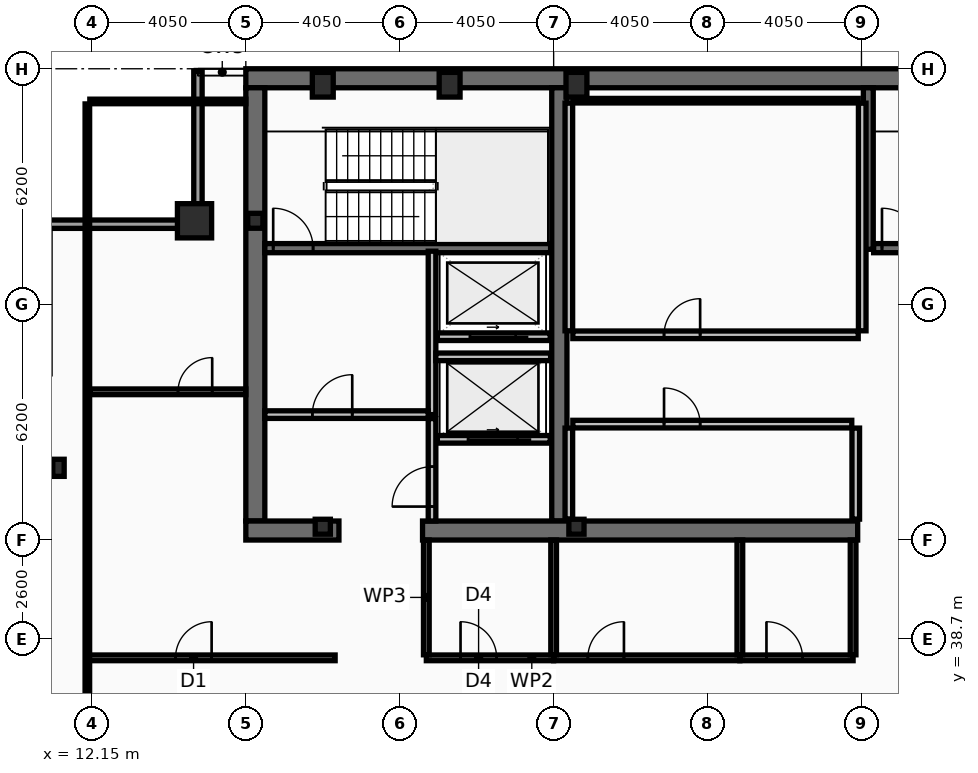
"""IFC4 building model, lengths in metres.
Left out: names, types, materials, properties, quantities, classifications, styles, units other than length and angle.
Written with IfcOpenShell. Run it as: python <this file> out.ifc"""

import sys

from ifc_helpers import new_model, si_unit, direction, frame, frame_2d, origin, origin_2d, place, context, subcontext, project, spatial, rectangle, hollow_rectangle, i_section, extrude, element, fill, save


model = new_model("IFC4")
c1 = context("Model", 3, precision=1e-05, world=origin(), true_north=direction((0.0, 1.0)))
c2 = subcontext(c1, "Body", "Model", "MODEL_VIEW")
j1 = project(units=[si_unit("LENGTHUNIT", "METRE"), si_unit("PLANEANGLEUNIT", "RADIAN")], contexts=[c1])
p1 = place(None, origin())
s1 = spatial("IfcSite", under=j1, at=p1, CompositionType="ELEMENT")
p2 = place(p1, origin())
s2 = spatial("IfcBuilding", under=s1, at=p2, CompositionType="ELEMENT")
p3 = place(p2, frame((0.0, 0.0, 336.2)))
s3 = spatial("IfcBuildingStorey", under=s2, at=p3, CompositionType="ELEMENT", Elevation=336.2)
p4 = place(p3, frame((16.2, 53.45, 0.0), z_axis=(0.0, 0.0, 1.0), x_axis=(1.0, 0.0, 0.0)))
e1 = element("IfcWall", 1, at=p4, inside=s3, PredefinedType="SHEAR", context=c2, shape_type="SweptSolid", body=[
    extrude(rectangle(XDim=40.5, YDim=0.5, at=frame_2d((20.25, 0.0))), origin(), (0.0, 0.0, 1.0), 3.44),
])
p5 = place(p3, frame((16.45, 41.8, 0.0), z_axis=(0.0, 0.0, 1.0), x_axis=(0.0, 1.0, 0.0)))
e2 = element("IfcWall", 2, at=p5, inside=s3, PredefinedType="SHEAR", context=c2, shape_type="SweptSolid", body=[
    extrude(rectangle(XDim=11.4, YDim=0.5, at=frame_2d((5.7, 0.0))), origin(), (0.0, 0.0, 1.0), 3.44),
])
p6 = place(p3, frame((24.45, 41.8, 0.0), z_axis=(0.0, 0.0, 1.0), x_axis=(0.0, 1.0, 0.0)))
e3 = element("IfcWall", 3, at=p6, inside=s3, PredefinedType="SHEAR", context=c2, shape_type="SweptSolid", body=[
    extrude(rectangle(XDim=11.4, YDim=0.4, at=frame_2d((5.7, 0.0))), origin(), (0.0, 0.0, 1.0), 3.44),
])
p7 = place(p3, frame((18.65, 41.55, 0.0), z_axis=(0.0, 0.0, 1.0), x_axis=(-1.0, 0.0, 0.0)))
e4 = element("IfcWall", 4, at=p7, inside=s3, PredefinedType="SHEAR", context=c2, shape_type="SweptSolid", body=[
    extrude(rectangle(XDim=2.45, YDim=0.5, at=frame_2d((1.225, 0.0))), origin(), (0.0, 0.0, 1.0), 3.44),
])
p8 = place(p3, frame((32.3, 41.55, 0.0), z_axis=(0.0, 0.0, 1.0), x_axis=(-1.0, 0.0, 0.0)))
e5 = element("IfcWall", 5, at=p8, inside=s3, PredefinedType="SHEAR", context=c2, shape_type="SweptSolid", body=[
    extrude(rectangle(XDim=11.45, YDim=0.5, at=frame_2d((5.725, 0.0))), origin(), (0.0, 0.0, 1.0), 3.44),
])
p9 = place(p3, frame((32.58, 48.95, 0.0), z_axis=(0.0, 0.0, 1.0), x_axis=(0.0, 1.0, 0.0)))
e6 = element("IfcWall", 6, at=p9, inside=s3, PredefinedType="SHEAR", context=c2, shape_type="SweptSolid", body=[
    extrude(rectangle(XDim=4.25, YDim=0.26, at=frame_2d((2.125, 0.0))), origin(), (0.0, 0.0, 1.0), 3.44),
])
p10 = place(p3, frame((16.7, 48.98, 0.0), z_axis=(0.0, 0.0, 1.0), x_axis=(1.0, 0.0, 0.0)))
e7 = element("IfcWall", 7, at=p10, inside=s3, PredefinedType="SHEAR", context=c2, shape_type="SweptSolid", body=[
    extrude(rectangle(XDim=7.52, YDim=0.24, at=frame_2d((3.76, 0.0))), origin(), (0.0, 0.0, 1.0), 3.44),
])
p11 = place(p10, frame((0.22, 0.0, 0.0)))
e8 = element("IfcOpeningElement", 8, at=p11, cuts=e7, PredefinedType="OPENING", context=c2, shape_type="SweptSolid", body=[
    extrude(rectangle(XDim=1.05, YDim=2.15, at=frame_2d((0.525, 1.075))), frame((0.0, 0.13, 0.0), z_axis=(0.0, -1.0, 0.0), x_axis=(1.0, 0.0, 0.0)), (0.0, 0.0, 1.0), 0.26),
])
p12 = place(p3, frame((32.72, 48.98, 0.0), z_axis=(0.0, 0.0, 1.0), x_axis=(1.0, 0.0, 0.0)))
e9 = element("IfcWall", 9, at=p12, inside=s3, PredefinedType="SHEAR", context=c2, shape_type="SweptSolid", body=[
    extrude(rectangle(XDim=7.56, YDim=0.24, at=frame_2d((3.78, 0.0))), origin(), (0.0, 0.0, 1.0), 3.44),
])
p13 = place(p12, frame((0.22, 0.0, 0.0)))
e10 = element("IfcOpeningElement", 10, at=p13, cuts=e9, PredefinedType="OPENING", context=c2, shape_type="SweptSolid", body=[
    extrude(rectangle(XDim=1.05, YDim=2.15, at=frame_2d((0.525, 1.075))), frame((0.0, 0.13, 0.0), z_axis=(0.0, -1.0, 0.0), x_axis=(1.0, 0.0, 0.0)), (0.0, 0.0, 1.0), 0.26),
])
p14 = place(p3, frame((14.85, 49.7, 0.0), z_axis=(0.0, 0.0, 1.0), x_axis=(1.0, 0.0, 0.0)))
e11 = element("IfcColumn", 11, at=p14, inside=s3, PredefinedType="COLUMN", context=c2, shape_type="SweptSolid", body=[
    extrude(hollow_rectangle(XDim=0.9, YDim=0.9, WallThickness=0.05, at=origin_2d()), origin(), (0.0, 0.0, 1.0), 3.6),
])
for number, where, z_axis, x_axis in (
    (12, (18.225, 53.28, 0.0), (0.0, 0.0, 1.0), (1.0, 0.0, 0.0)),
    (13, (21.562, 53.28, 0.0), (0.0, 0.0, 1.0), (1.0, 0.0, 0.0)),
    (14, (24.9, 53.28, 0.0), (0.0, 0.0, 1.0), (1.0, 0.0, 0.0)),
):
    element("IfcColumn", number, at=place(p3, frame(where, z_axis=z_axis, x_axis=x_axis)), inside=s3, PredefinedType="COLUMN", context=c2, shape_type="SweptSolid", body=[
        extrude(hollow_rectangle(XDim=0.55, YDim=0.65, WallThickness=0.04, at=origin_2d()), origin(), (0.0, 0.0, 1.0), 3.6),
    ])
p15 = place(p3, frame((11.27, 43.2, 0.0), z_axis=(0.0, 0.0, 1.0), x_axis=(1.0, 0.0, 0.0)))
e15 = element("IfcColumn", 15, at=p15, inside=s3, PredefinedType="COLUMN", context=c2, shape_type="SweptSolid", body=[
    extrude(i_section(OverallWidth=0.3, OverallDepth=0.45, WebThickness=0.014, FlangeThickness=0.026, at=origin_2d()), origin(), (0.0, 0.0, 1.0), 3.6),
])
for number, where, z_axis, x_axis in (
    (16, (16.45, 49.7, 0.0), (0.0, 0.0, 1.0), (1.0, 0.0, 0.0)),
    (17, (18.225, 41.65, 0.0), (0.0, 0.0, 1.0), (1.0, 0.0, 0.0)),
    (18, (24.9, 41.65, 0.0), (0.0, 0.0, 1.0), (1.0, 0.0, 0.0)),
):
    element("IfcColumn", number, at=place(p3, frame(where, z_axis=z_axis, x_axis=x_axis)), inside=s3, PredefinedType="COLUMN", context=c2, shape_type="SweptSolid", body=[
        extrude(i_section(OverallWidth=0.399, OverallDepth=0.393, WebThickness=0.023, FlangeThickness=0.037, at=origin_2d()), origin(), (0.0, 0.0, 1.0), 3.6),
    ])
p16 = place(p3, frame((10.83, 49.61, 0.0), z_axis=(0.0, 0.0, 1.0), x_axis=(1.0, 0.0, 0.0)))
e19 = element("IfcWall", 19, at=p16, inside=s3, PredefinedType="SOLIDWALL", context=c2, shape_type="SweptSolid", body=[
    extrude(rectangle(XDim=4.22, YDim=0.22, at=frame_2d((2.11, 0.0))), origin(), (0.0, 0.0, 1.0), 2.88),
])
p17 = place(p3, frame((14.94, 49.72, 0.0), z_axis=(0.0, 0.0, 1.0), x_axis=(0.0, 1.0, 0.0)))
e20 = element("IfcWall", 20, at=p17, inside=s3, PredefinedType="SOLIDWALL", context=c2, shape_type="SweptSolid", body=[
    extrude(rectangle(XDim=3.91, YDim=0.22, at=frame_2d((1.955, 0.0))), origin(), (0.0, 0.0, 1.0), 2.88),
])
p18 = place(p3, frame((24.21, 43.95, 0.0), z_axis=(0.0, 0.0, 1.0), x_axis=(-1.0, 0.0, 0.0)))
e21 = element("IfcWall", 21, at=p18, inside=s3, PredefinedType="PARTITIONING", context=c2, shape_type="SweptSolid", body=[
    extrude(rectangle(XDim=2.97, YDim=0.2, at=frame_2d((1.485, 0.0))), origin(), (0.0, 0.0, 1.0), 3.44),
])
p19 = place(p18, frame((0.86, 0.0, 0.0)))
e22 = element("IfcOpeningElement", 22, at=p19, cuts=e21, PredefinedType="OPENING", context=c2, shape_type="SweptSolid", body=[
    extrude(rectangle(XDim=1.3, YDim=2.18, at=frame_2d((0.65, 1.09))), frame((0.0, 0.11, 0.0), z_axis=(0.0, -1.0, 0.0), x_axis=(1.0, 0.0, 0.0)), (0.0, 0.0, 1.0), 0.22),
])
p20 = place(p3, frame((24.21, 46.65, 0.0), z_axis=(0.0, 0.0, 1.0), x_axis=(-1.0, 0.0, 0.0)))
e23 = element("IfcWall", 23, at=p20, inside=s3, PredefinedType="PARTITIONING", context=c2, shape_type="SweptSolid", body=[
    extrude(rectangle(XDim=2.97, YDim=0.2, at=frame_2d((1.485, 0.0))), origin(), (0.0, 0.0, 1.0), 3.44),
])
p21 = place(p20, frame((0.91, 0.0, 0.0)))
e24 = element("IfcOpeningElement", 24, at=p21, cuts=e23, PredefinedType="OPENING", context=c2, shape_type="SweptSolid", body=[
    extrude(rectangle(XDim=1.2, YDim=2.18, at=frame_2d((0.6, 1.09))), frame((0.0, 0.11, 0.0), z_axis=(0.0, -1.0, 0.0), x_axis=(1.0, 0.0, 0.0)), (0.0, 0.0, 1.0), 0.22),
])
p22 = place(p3, frame((21.1, 44.6, 0.0), z_axis=(0.0, 0.0, 1.0), x_axis=(0.0, 1.0, 0.0)))
e25 = element("IfcWall", 25, at=p22, inside=s3, PredefinedType="PARTITIONING", context=c2, shape_type="SweptSolid", body=[
    extrude(rectangle(XDim=4.3, YDim=0.2, at=frame_2d((2.15, 0.0))), origin(), (0.0, 0.0, 1.0), 3.44),
])
p23 = place(p3, frame((16.7, 44.6, 0.0), z_axis=(0.0, 0.0, 1.0), x_axis=(1.0, 0.0, 0.0)))
e26 = element("IfcWall", 26, at=p23, inside=s3, PredefinedType="PARTITIONING", context=c2, shape_type="SweptSolid", body=[
    extrude(rectangle(XDim=4.3, YDim=0.2, at=frame_2d((2.15, 0.0))), origin(), (0.0, 0.0, 1.0), 3.44),
])
p24 = place(p23, frame((1.25, 0.0, 0.0)))
e27 = element("IfcOpeningElement", 27, at=p24, cuts=e26, PredefinedType="OPENING", context=c2, shape_type="SweptSolid", body=[
    extrude(rectangle(XDim=1.05, YDim=2.15, at=frame_2d((0.525, 1.075))), frame((0.0, 0.11, 0.0), z_axis=(0.0, -1.0, 0.0), x_axis=(1.0, 0.0, 0.0)), (0.0, 0.0, 1.0), 0.22),
])
p25 = place(p3, frame((21.2, 46.12, 0.0), z_axis=(0.0, 0.0, 1.0), x_axis=(1.0, 0.0, 0.0)))
e28 = element("IfcWall", 28, at=p25, inside=s3, PredefinedType="PARTITIONING", context=c2, shape_type="SweptSolid", body=[
    extrude(rectangle(XDim=3.02, YDim=0.2, at=frame_2d((1.51, 0.0))), origin(), (0.0, 0.0, 1.0), 3.44),
])
p26 = place(p3, frame((21.1, 41.8, 0.0), z_axis=(0.0, 0.0, 1.0), x_axis=(0.0, 1.0, 0.0)))
e29 = element("IfcWall", 29, at=p26, inside=s3, PredefinedType="PARTITIONING", context=c2, shape_type="SweptSolid", body=[
    extrude(rectangle(XDim=2.695, YDim=0.2, at=frame_2d((1.348, 0.0))), origin(), (0.0, 0.0, 1.0), 3.44),
])
p27 = place(p26, frame((0.38, 0.0, 0.0)))
e30 = element("IfcOpeningElement", 30, at=p27, cuts=e29, PredefinedType="OPENING", context=c2, shape_type="SweptSolid", body=[
    extrude(rectangle(XDim=1.05, YDim=2.15, at=frame_2d((0.525, 1.075))), frame((0.0, 0.11, 0.0), z_axis=(0.0, -1.0, 0.0), x_axis=(1.0, 0.0, 0.0)), (0.0, 0.0, 1.0), 0.22),
])
for number, where, z_axis, x_axis in (
    (31, (24.7, 46.805, 0.0), (0.0, 0.0, 1.0), (0.0, 1.0, 0.0)),
    (32, (32.42, 46.805, 0.0), (0.0, 0.0, 1.0), (0.0, 1.0, 0.0)),
):
    element("IfcWall", number, at=place(p3, frame(where, z_axis=z_axis, x_axis=x_axis)), inside=s3, PredefinedType="PARTITIONING", context=c2, shape_type="SweptSolid", body=[
        extrude(rectangle(XDim=5.99, YDim=0.2, at=frame_2d((2.995, 0.0))), origin(), (0.0, 0.0, 1.0), 3.44),
    ])
p28 = place(p3, frame((24.805, 52.86, 0.0), z_axis=(0.0, 0.0, 1.0), x_axis=(1.0, 0.0, 0.0)))
e33 = element("IfcWall", 33, at=p28, inside=s3, PredefinedType="PARTITIONING", context=c2, shape_type="SweptSolid", body=[
    extrude(rectangle(XDim=7.51, YDim=0.12, at=frame_2d((3.755, 0.0))), origin(), (0.0, 0.0, 1.0), 3.44),
])
p29 = place(p3, frame((24.805, 46.7, 0.0), z_axis=(0.0, 0.0, 1.0), x_axis=(1.0, 0.0, 0.0)))
e34 = element("IfcWall", 34, at=p29, inside=s3, PredefinedType="PARTITIONING", context=c2, shape_type="SweptSolid", body=[
    extrude(rectangle(XDim=7.51, YDim=0.2, at=frame_2d((3.755, 0.0))), origin(), (0.0, 0.0, 1.0), 3.44),
])
p30 = place(p29, frame((2.4, 0.0, 0.0)))
e35 = element("IfcOpeningElement", 35, at=p30, cuts=e34, PredefinedType="OPENING", context=c2, shape_type="SweptSolid", body=[
    extrude(rectangle(XDim=0.95, YDim=2.1, at=frame_2d((0.475, 1.05))), frame((0.0, 0.11, 0.0), z_axis=(0.0, -1.0, 0.0), x_axis=(1.0, 0.0, 0.0)), (0.0, 0.0, 1.0), 0.22),
])
for number, where, z_axis, x_axis in (
    (36, (24.7, 41.85, 0.0), (0.0, 0.0, 1.0), (0.0, 1.0, 0.0)),
    (37, (32.25, 41.85, 0.0), (0.0, 0.0, 1.0), (0.0, 1.0, 0.0)),
):
    element("IfcWall", number, at=place(p3, frame(where, z_axis=z_axis, x_axis=x_axis)), inside=s3, PredefinedType="PARTITIONING", context=c2, shape_type="SweptSolid", body=[
        extrude(rectangle(XDim=2.395, YDim=0.2, at=frame_2d((1.198, 0.0))), origin(), (0.0, 0.0, 1.0), 3.44),
    ])
p31 = place(p3, frame((24.805, 44.35, 0.0), z_axis=(0.0, 0.0, 1.0), x_axis=(1.0, 0.0, 0.0)))
e38 = element("IfcWall", 38, at=p31, inside=s3, PredefinedType="PARTITIONING", context=c2, shape_type="SweptSolid", body=[
    extrude(rectangle(XDim=7.34, YDim=0.2, at=frame_2d((3.67, 0.0))), origin(), (0.0, 0.0, 1.0), 3.44),
])
p32 = place(p31, frame((2.4, 0.0, 0.0)))
e39 = element("IfcOpeningElement", 39, at=p32, cuts=e38, PredefinedType="OPENING", context=c2, shape_type="SweptSolid", body=[
    extrude(rectangle(XDim=0.95, YDim=2.1, at=frame_2d((0.475, 1.05))), frame((0.0, 0.11, 0.0), z_axis=(0.0, -1.0, 0.0), x_axis=(1.0, 0.0, 0.0)), (0.0, 0.0, 1.0), 0.22),
])
p33 = place(p3, frame((20.95, 38.2, 0.0), z_axis=(0.0, 0.0, 1.0), x_axis=(1.0, 0.0, 0.0)))
e40 = element("IfcWall", 40, at=p33, inside=s3, PredefinedType="PARTITIONING", context=c2, shape_type="SweptSolid", body=[
    extrude(rectangle(XDim=3.35, YDim=0.15, at=frame_2d((1.675, 0.0))), origin(), (0.0, 0.0, 1.0), 3.44),
])
p34 = place(p33, frame((0.9, 0.0, 0.0)))
e41 = element("IfcOpeningElement", 41, at=p34, cuts=e40, PredefinedType="OPENING", context=c2, shape_type="SweptSolid", body=[
    extrude(rectangle(XDim=0.95, YDim=2.05, at=frame_2d((0.475, 1.025))), frame((0.0, 0.085, 0.0), z_axis=(0.0, -1.0, 0.0), x_axis=(1.0, 0.0, 0.0)), (0.0, 0.0, 1.0), 0.17),
])
p35 = place(p3, frame((24.3, 38.2, 0.0), z_axis=(0.0, 0.0, 1.0), x_axis=(1.0, 0.0, 0.0)))
e42 = element("IfcWall", 42, at=p35, inside=s3, PredefinedType="PARTITIONING", context=c2, shape_type="SweptSolid", body=[
    extrude(rectangle(XDim=4.9, YDim=0.15, at=frame_2d((2.45, 0.0))), origin(), (0.0, 0.0, 1.0), 2.83),
])
p36 = place(p35, frame((0.9, 0.0, 0.0)))
e43 = element("IfcOpeningElement", 43, at=p36, cuts=e42, PredefinedType="OPENING", context=c2, shape_type="SweptSolid", body=[
    extrude(rectangle(XDim=0.95, YDim=2.05, at=frame_2d((0.475, 1.025))), frame((0.0, 0.085, 0.0), z_axis=(0.0, -1.0, 0.0), x_axis=(1.0, 0.0, 0.0)), (0.0, 0.0, 1.0), 0.17),
])
p37 = place(p3, frame((29.2, 38.2, 0.0), z_axis=(0.0, 0.0, 1.0), x_axis=(1.0, 0.0, 0.0)))
e44 = element("IfcWall", 44, at=p37, inside=s3, PredefinedType="PARTITIONING", context=c2, shape_type="SweptSolid", body=[
    extrude(rectangle(XDim=2.98, YDim=0.15, at=frame_2d((1.49, 0.0))), origin(), (0.0, 0.0, 1.0), 3.44),
])
p38 = place(p37, frame((0.7, 0.0, 0.0)))
e45 = element("IfcOpeningElement", 45, at=p38, cuts=e44, PredefinedType="OPENING", context=c2, shape_type="SweptSolid", body=[
    extrude(rectangle(XDim=0.95, YDim=2.05, at=frame_2d((0.475, 1.025))), frame((0.0, 0.085, 0.0), z_axis=(0.0, -1.0, 0.0), x_axis=(1.0, 0.0, 0.0)), (0.0, 0.0, 1.0), 0.17),
])
for number, where, z_axis, x_axis in (
    (46, (20.95, 38.28, 0.0), (0.0, 0.0, 1.0), (0.0, 1.0, 0.0)),
    (47, (24.3, 38.28, 0.0), (0.0, 0.0, 1.0), (0.0, 1.0, 0.0)),
    (48, (29.2, 38.28, 0.0), (0.0, 0.0, 1.0), (0.0, 1.0, 0.0)),
    (49, (32.18, 38.28, 0.0), (0.0, 0.0, 1.0), (0.0, 1.0, 0.0)),
):
    element("IfcWall", number, at=place(p3, frame(where, z_axis=z_axis, x_axis=x_axis)), inside=s3, PredefinedType="PARTITIONING", context=c2, shape_type="SweptSolid", body=[
        extrude(rectangle(XDim=3.02, YDim=0.15, at=frame_2d((1.51, 0.0))), origin(), (0.0, 0.0, 1.0), 3.44),
    ])
p39 = place(p3, frame((12.03, 38.2, 0.0), z_axis=(0.0, 0.0, 1.0), x_axis=(1.0, 0.0, 0.0)))
e50 = element("IfcWall", 50, at=p39, inside=s3, PredefinedType="PARTITIONING", context=c2, shape_type="SweptSolid", body=[
    extrude(rectangle(XDim=6.52, YDim=0.15, at=frame_2d((3.26, 0.0))), origin(), (0.0, 0.0, 1.0), 2.83),
])
p40 = place(p39, frame((2.32, 0.0, 0.0)))
e51 = element("IfcOpeningElement", 51, at=p40, cuts=e50, PredefinedType="OPENING", context=c2, shape_type="SweptSolid", body=[
    extrude(rectangle(XDim=0.95, YDim=2.05, at=frame_2d((0.475, 1.025))), frame((0.0, 0.085, 0.0), z_axis=(0.0, -1.0, 0.0), x_axis=(1.0, 0.0, 0.0)), (0.0, 0.0, 1.0), 0.17),
])
p41 = place(p3, frame((12.095, 45.2, 0.0), z_axis=(0.0, 0.0, 1.0), x_axis=(1.0, 0.0, 0.0)))
e52 = element("IfcWall", 52, at=p41, inside=s3, PredefinedType="PARTITIONING", context=c2, shape_type="SweptSolid", body=[
    extrude(rectangle(XDim=4.105, YDim=0.15, at=frame_2d((2.052, 0.0))), origin(), (0.0, 0.0, 1.0), 2.88),
])
p42 = place(p41, frame((2.32, 0.0, 0.0)))
e53 = element("IfcOpeningElement", 53, at=p42, cuts=e52, PredefinedType="OPENING", context=c2, shape_type="SweptSolid", body=[
    extrude(rectangle(XDim=0.9, YDim=2.05, at=frame_2d((0.45, 1.025))), frame((0.0, 0.085, 0.0), z_axis=(0.0, -1.0, 0.0), x_axis=(1.0, 0.0, 0.0)), (0.0, 0.0, 1.0), 0.17),
])
p43 = place(p3, frame((12.03, 10.665, 0.0), z_axis=(0.0, 0.0, 1.0), x_axis=(0.0, 1.0, 0.0)))
e54 = element("IfcWall", 54, at=p43, inside=s3, PredefinedType="PARTITIONING", context=c2, shape_type="SweptSolid", body=[
    extrude(rectangle(XDim=42.11, YDim=0.12, at=frame_2d((21.055, 0.0))), origin(), (0.0, 0.0, 1.0), 2.83),
])
p44 = place(p3, frame((12.095, 52.84, 0.0), z_axis=(0.0, 0.0, 1.0), x_axis=(1.0, 0.0, 0.0)))
e55 = element("IfcWall", 55, at=p44, inside=s3, PredefinedType="PARTITIONING", context=c2, shape_type="SweptSolid", body=[
    extrude(rectangle(XDim=4.105, YDim=0.12, at=frame_2d((2.052, 0.0))), origin(), (0.0, 0.0, 1.0), 3.44),
])
p45 = place(p11, origin())
e56 = element("IfcDoor", 56, at=p45, inside=s3, OperationType="SINGLE_SWING_LEFT", PredefinedType="DOOR", context=c2, shape_type="SweptSolid", body=[
    extrude(rectangle(XDim=1.05, YDim=2.15, at=frame_2d((0.525, 1.075))), frame((0.0, 0.025, 0.0), z_axis=(0.0, -1.0, 0.0), x_axis=(1.0, 0.0, 0.0)), (0.0, 0.0, 1.0), 0.05),
])
fill(e8, e56)
p46 = place(p13, origin())
e57 = element("IfcDoor", 57, at=p46, inside=s3, OperationType="SINGLE_SWING_LEFT", PredefinedType="DOOR", context=c2, shape_type="SweptSolid", body=[
    extrude(rectangle(XDim=1.05, YDim=2.15, at=frame_2d((0.525, 1.075))), frame((0.0, 0.025, 0.0), z_axis=(0.0, -1.0, 0.0), x_axis=(1.0, 0.0, 0.0)), (0.0, 0.0, 1.0), 0.05),
])
fill(e10, e57)
p47 = place(p19, origin())
e58 = element("IfcDoor", 58, at=p47, inside=s3, OperationType="SLIDING_TO_LEFT", PredefinedType="DOOR", context=c2, shape_type="SweptSolid", body=[
    extrude(rectangle(XDim=1.3, YDim=2.18, at=frame_2d((0.65, 1.09))), frame((0.0, 0.025, 0.0), z_axis=(0.0, -1.0, 0.0), x_axis=(1.0, 0.0, 0.0)), (0.0, 0.0, 1.0), 0.05),
])
fill(e22, e58)
p48 = place(p21, origin())
e59 = element("IfcDoor", 59, at=p48, inside=s3, OperationType="SLIDING_TO_LEFT", PredefinedType="DOOR", context=c2, shape_type="SweptSolid", body=[
    extrude(rectangle(XDim=1.2, YDim=2.18, at=frame_2d((0.6, 1.09))), frame((0.0, 0.025, 0.0), z_axis=(0.0, -1.0, 0.0), x_axis=(1.0, 0.0, 0.0)), (0.0, 0.0, 1.0), 0.05),
])
fill(e24, e59)
p49 = place(p24, origin())
e60 = element("IfcDoor", 60, at=p49, inside=s3, OperationType="SINGLE_SWING_RIGHT", PredefinedType="DOOR", context=c2, shape_type="SweptSolid", body=[
    extrude(rectangle(XDim=1.05, YDim=2.15, at=frame_2d((0.525, 1.075))), frame((0.0, 0.025, 0.0), z_axis=(0.0, -1.0, 0.0), x_axis=(1.0, 0.0, 0.0)), (0.0, 0.0, 1.0), 0.05),
])
fill(e27, e60)
p50 = place(p27, origin())
e61 = element("IfcDoor", 61, at=p50, inside=s3, OperationType="SINGLE_SWING_LEFT", PredefinedType="DOOR", context=c2, shape_type="SweptSolid", body=[
    extrude(rectangle(XDim=1.05, YDim=2.15, at=frame_2d((0.525, 1.075))), frame((0.0, 0.025, 0.0), z_axis=(0.0, -1.0, 0.0), x_axis=(1.0, 0.0, 0.0)), (0.0, 0.0, 1.0), 0.05),
])
fill(e30, e61)
p51 = place(p30, origin())
e62 = element("IfcDoor", 62, at=p51, inside=s3, OperationType="SINGLE_SWING_RIGHT", PredefinedType="DOOR", context=c2, shape_type="SweptSolid", body=[
    extrude(rectangle(XDim=0.95, YDim=2.1, at=frame_2d((0.475, 1.05))), frame((0.0, 0.025, 0.0), z_axis=(0.0, -1.0, 0.0), x_axis=(1.0, 0.0, 0.0)), (0.0, 0.0, 1.0), 0.05),
])
fill(e35, e62)
p52 = place(p32, origin())
e63 = element("IfcDoor", 63, at=p52, inside=s3, OperationType="SINGLE_SWING_LEFT", PredefinedType="DOOR", context=c2, shape_type="SweptSolid", body=[
    extrude(rectangle(XDim=0.95, YDim=2.1, at=frame_2d((0.475, 1.05))), frame((0.0, 0.025, 0.0), z_axis=(0.0, -1.0, 0.0), x_axis=(1.0, 0.0, 0.0)), (0.0, 0.0, 1.0), 0.05),
])
fill(e39, e63)
p53 = place(p34, origin())
e64 = element("IfcDoor", 64, at=p53, inside=s3, OperationType="SINGLE_SWING_LEFT", PredefinedType="DOOR", context=c2, shape_type="SweptSolid", body=[
    extrude(rectangle(XDim=0.95, YDim=2.05, at=frame_2d((0.475, 1.025))), frame((0.0, 0.025, 0.0), z_axis=(0.0, -1.0, 0.0), x_axis=(1.0, 0.0, 0.0)), (0.0, 0.0, 1.0), 0.05),
])
fill(e41, e64)
p54 = place(p36, origin())
e65 = element("IfcDoor", 65, at=p54, inside=s3, OperationType="SINGLE_SWING_RIGHT", PredefinedType="DOOR", context=c2, shape_type="SweptSolid", body=[
    extrude(rectangle(XDim=0.95, YDim=2.05, at=frame_2d((0.475, 1.025))), frame((0.0, 0.025, 0.0), z_axis=(0.0, -1.0, 0.0), x_axis=(1.0, 0.0, 0.0)), (0.0, 0.0, 1.0), 0.05),
])
fill(e43, e65)
p55 = place(p38, origin())
e66 = element("IfcDoor", 66, at=p55, inside=s3, OperationType="SINGLE_SWING_LEFT", PredefinedType="DOOR", context=c2, shape_type="SweptSolid", body=[
    extrude(rectangle(XDim=0.95, YDim=2.05, at=frame_2d((0.475, 1.025))), frame((0.0, 0.025, 0.0), z_axis=(0.0, -1.0, 0.0), x_axis=(1.0, 0.0, 0.0)), (0.0, 0.0, 1.0), 0.05),
])
fill(e45, e66)
p56 = place(p40, origin())
e67 = element("IfcDoor", 67, at=p56, inside=s3, OperationType="SINGLE_SWING_RIGHT", PredefinedType="DOOR", context=c2, shape_type="SweptSolid", body=[
    extrude(rectangle(XDim=0.95, YDim=2.05, at=frame_2d((0.475, 1.025))), frame((0.0, 0.025, 0.0), z_axis=(0.0, -1.0, 0.0), x_axis=(1.0, 0.0, 0.0)), (0.0, 0.0, 1.0), 0.05),
])
fill(e51, e67)
p57 = place(p42, origin())
e68 = element("IfcDoor", 68, at=p57, inside=s3, OperationType="SINGLE_SWING_RIGHT", PredefinedType="DOOR", context=c2, shape_type="SweptSolid", body=[
    extrude(rectangle(XDim=0.9, YDim=2.05, at=frame_2d((0.45, 1.025))), frame((0.0, 0.025, 0.0), z_axis=(0.0, -1.0, 0.0), x_axis=(1.0, 0.0, 0.0)), (0.0, 0.0, 1.0), 0.05),
])
fill(e53, e68)
save(model, sys.argv[1])
